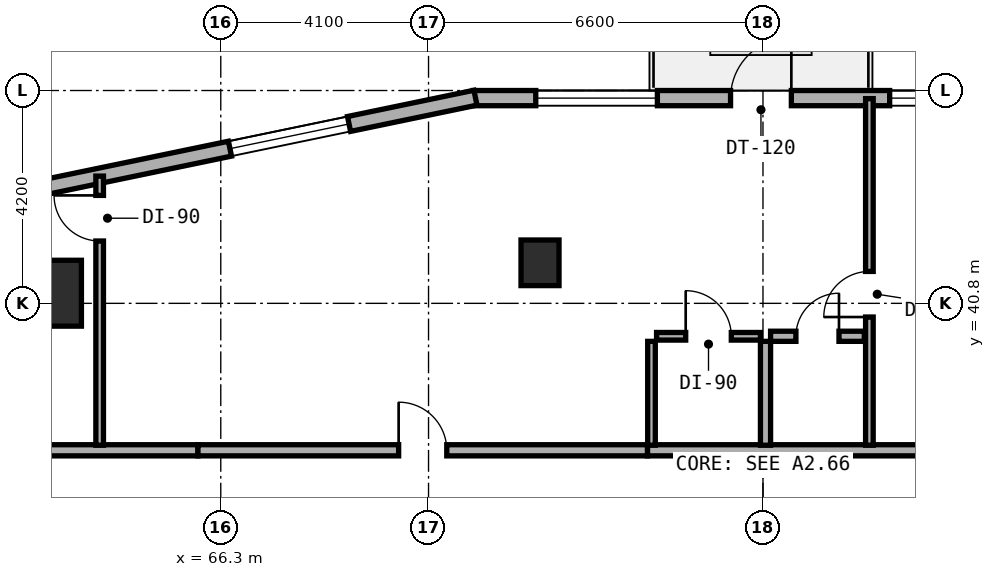
"""IFC4 building model, lengths in metres.
Left out: names, types, materials, properties, quantities, classifications, styles, units other than length and angle.
Written with IfcOpenShell. Run it as: python <this file> out.ifc"""

import sys

from ifc_helpers import new_model, si_unit, direction, frame, frame_2d, origin, origin_2d, place, context, subcontext, project, spatial, rectangle, extrude, element, fill, save


model = new_model("IFC4")
c1 = context("Model", 3, precision=1e-05, world=origin(), true_north=direction((0.0, 1.0)))
c2 = subcontext(c1, "Body", "Model", "MODEL_VIEW")
j1 = project(units=[si_unit("LENGTHUNIT", "METRE"), si_unit("PLANEANGLEUNIT", "RADIAN")], contexts=[c1])
p1 = place(None, origin())
s1 = spatial("IfcSite", under=j1, at=p1, CompositionType="ELEMENT")
p2 = place(p1, origin())
s2 = spatial("IfcBuilding", under=s1, at=p2, CompositionType="ELEMENT")
p3 = place(p2, frame((0.0, 0.0, 48.5)))
s3 = spatial("IfcBuildingStorey", under=s2, at=p3, CompositionType="ELEMENT", Elevation=48.5)
p4 = place(p3, frame((72.6, 41.6, 0.0), z_axis=(0.0, 0.0, 1.0), x_axis=(1.0, 0.0, 0.0)))
e1 = element("IfcColumn", 1, at=p4, inside=s3, PredefinedType="COLUMN", context=c2, shape_type="SweptSolid", body=[
    extrude(rectangle(XDim=0.75, YDim=0.9, at=origin_2d()), origin(), (0.0, 0.0, 1.0), 3.5),
])
p5 = place(p3, frame((63.0, 41.0, 0.0), z_axis=(0.0, 0.0, 1.0), x_axis=(1.0, 0.0, 0.0)))
e2 = element("IfcColumn", 2, at=p5, inside=s3, PredefinedType="COLUMN", context=c2, shape_type="SweptSolid", body=[
    extrude(rectangle(XDim=1.1, YDim=1.3, at=origin_2d()), origin(), (0.0, 0.0, 1.0), 3.5),
])
p6 = place(p3, frame((82.673, 44.85, 0.0), z_axis=(0.0, 0.0, 1.0), x_axis=(-1.0, 0.0, 0.0)))
e3 = element("IfcWall", 3, at=p6, inside=s3, PredefinedType="STANDARD", context=c2, shape_type="SweptSolid", body=[
    extrude(rectangle(XDim=11.391, YDim=0.3, at=frame_2d((5.696, 0.0))), origin(), (0.0, 0.0, 1.0), 3.25),
])
p7 = place(p6, frame((5.113, 0.0, 0.0)))
e4 = element("IfcOpeningElement", 4, at=p7, cuts=e3, PredefinedType="OPENING", context=c2, shape_type="SweptSolid", body=[
    extrude(rectangle(XDim=1.2, YDim=2.15, at=frame_2d((0.6, 1.075))), frame((0.0, 0.16, 0.0), z_axis=(0.0, -1.0, 0.0), x_axis=(1.0, 0.0, 0.0)), (0.0, 0.0, 1.0), 0.32),
])
p8 = place(p6, frame((1.673, 0.0, 0.85)))
e5 = element("IfcOpeningElement", 5, at=p8, cuts=e3, PredefinedType="OPENING", context=c2, shape_type="SweptSolid", body=[
    extrude(rectangle(XDim=1.5, YDim=1.5, at=frame_2d((0.75, 0.75))), frame((0.0, 0.16, 0.0), z_axis=(0.0, -1.0, 0.0), x_axis=(1.0, 0.0, 0.0)), (0.0, 0.0, 1.0), 0.32),
])
p9 = place(p6, frame((7.757, 0.0, 0.8)))
e6 = element("IfcOpeningElement", 6, at=p9, cuts=e3, PredefinedType="OPENING", context=c2, shape_type="SweptSolid", body=[
    extrude(rectangle(XDim=2.4, YDim=1.6, at=frame_2d((1.2, 0.8))), frame((0.0, 0.16, 0.0), z_axis=(0.0, -1.0, 0.0), x_axis=(1.0, 0.0, 0.0)), (0.0, 0.0, 1.0), 0.32),
])
p10 = place(p3, frame((71.326, 44.858, 0.0), z_axis=(0.0, 0.0, 1.0), x_axis=(-0.979124350489, -0.203262161453, 0.0)))
e7 = element("IfcWall", 7, at=p10, inside=s3, PredefinedType="STANDARD", context=c2, shape_type="SweptSolid", body=[
    extrude(rectangle(XDim=8.889, YDim=0.3, at=frame_2d((4.445, 0.0))), origin(), (0.0, 0.0, 1.0), 3.25),
])
p11 = place(p10, frame((2.548, 0.0, 0.8)))
e8 = element("IfcOpeningElement", 8, at=p11, cuts=e7, PredefinedType="OPENING", context=c2, shape_type="SweptSolid", body=[
    extrude(rectangle(XDim=2.4, YDim=1.6, at=frame_2d((1.2, 0.8))), frame((0.0, 0.16, 0.0), z_axis=(0.0, -1.0, 0.0), x_axis=(1.0, 0.0, 0.0)), (0.0, 0.0, 1.0), 0.32),
])
p12 = place(p3, frame((58.16, 37.9, 0.0), z_axis=(0.0, 0.0, 1.0), x_axis=(1.0, 0.0, 0.0)))
e9 = element("IfcWall", 9, at=p12, inside=s3, PredefinedType="SOLIDWALL", context=c2, shape_type="SweptSolid", body=[
    extrude(rectangle(XDim=7.69, YDim=0.22, at=frame_2d((3.845, 0.0))), origin(), (0.0, 0.0, 1.0), 2.865),
])
p13 = place(p3, frame((74.72, 37.9, 0.0), z_axis=(0.0, 0.0, 1.0), x_axis=(1.0, 0.0, 0.0)))
e10 = element("IfcWall", 10, at=p13, inside=s3, PredefinedType="SOLIDWALL", context=c2, shape_type="SweptSolid", body=[
    extrude(rectangle(XDim=6.68, YDim=0.22, at=frame_2d((3.34, 0.0))), origin(), (0.0, 0.0, 1.0), 2.725),
])
p14 = place(p3, frame((65.85, 37.9, 0.0), z_axis=(0.0, 0.0, 1.0), x_axis=(1.0, 0.0, 0.0)))
e11 = element("IfcWall", 11, at=p14, inside=s3, PredefinedType="SOLIDWALL", context=c2, shape_type="SweptSolid", body=[
    extrude(rectangle(XDim=8.87, YDim=0.22, at=frame_2d((4.435, 0.0))), origin(), (0.0, 0.0, 1.0), 2.725),
])
p15 = place(p14, frame((3.96, 0.0, 0.0)))
e12 = element("IfcOpeningElement", 12, at=p15, cuts=e11, PredefinedType="OPENING", context=c2, shape_type="SweptSolid", body=[
    extrude(rectangle(XDim=0.95, YDim=2.1, at=frame_2d((0.475, 1.05))), frame((0.0, 0.12, 0.0), z_axis=(0.0, -1.0, 0.0), x_axis=(1.0, 0.0, 0.0)), (0.0, 0.0, 1.0), 0.24),
])
p16 = place(p3, frame((63.91, 38.0, 0.0), z_axis=(0.0, 0.0, 1.0), x_axis=(0.0, 1.0, 0.0)))
e13 = element("IfcWall", 13, at=p16, inside=s3, PredefinedType="PARTITIONING", context=c2, shape_type="SweptSolid", body=[
    extrude(rectangle(XDim=5.311, YDim=0.15, at=frame_2d((2.656, 0.0))), origin(), (0.0, 0.0, 1.0), 2.865),
])
p17 = place(p16, frame((4.03, 0.0, 0.0)))
e14 = element("IfcOpeningElement", 14, at=p17, cuts=e13, PredefinedType="OPENING", context=c2, shape_type="SweptSolid", body=[
    extrude(rectangle(XDim=0.9, YDim=2.1, at=frame_2d((0.45, 1.05))), frame((0.0, 0.085, 0.0), z_axis=(0.0, -1.0, 0.0), x_axis=(1.0, 0.0, 0.0)), (0.0, 0.0, 1.0), 0.17),
])
p18 = place(p3, frame((79.1, 38.0, 0.0), z_axis=(0.0, 0.0, 1.0), x_axis=(0.0, 1.0, 0.0)))
e15 = element("IfcWall", 15, at=p18, inside=s3, PredefinedType="PARTITIONING", context=c2, shape_type="SweptSolid", body=[
    extrude(rectangle(XDim=6.84, YDim=0.15, at=frame_2d((3.42, 0.0))), origin(), (0.0, 0.0, 1.0), 2.865),
])
p19 = place(p18, frame((2.53, 0.0, 0.0)))
e16 = element("IfcOpeningElement", 16, at=p19, cuts=e15, PredefinedType="OPENING", context=c2, shape_type="SweptSolid", body=[
    extrude(rectangle(XDim=0.9, YDim=2.1, at=frame_2d((0.45, 1.05))), frame((0.0, 0.085, 0.0), z_axis=(0.0, -1.0, 0.0), x_axis=(1.0, 0.0, 0.0)), (0.0, 0.0, 1.0), 0.17),
])
p20 = place(p3, frame((77.05, 38.0, 0.0), z_axis=(0.0, 0.0, 1.0), x_axis=(0.0, 1.0, 0.0)))
e17 = element("IfcWall", 17, at=p20, inside=s3, PredefinedType="PLUMBINGWALL", context=c2, shape_type="SweptSolid", body=[
    extrude(rectangle(XDim=2.05, YDim=0.2, at=frame_2d((1.025, 0.0))), origin(), (0.0, 0.0, 1.0), 2.985),
])
p21 = place(p3, frame((74.8, 38.0, 0.0), z_axis=(0.0, 0.0, 1.0), x_axis=(0.0, 1.0, 0.0)))
e18 = element("IfcWall", 18, at=p21, inside=s3, PredefinedType="PARTITIONING", context=c2, shape_type="SweptSolid", body=[
    extrude(rectangle(XDim=2.05, YDim=0.15, at=frame_2d((1.025, 0.0))), origin(), (0.0, 0.0, 1.0), 2.985),
])
p22 = place(p3, frame((77.15, 40.15, 0.0), z_axis=(0.0, 0.0, 1.0), x_axis=(1.0, 0.0, 0.0)))
e19 = element("IfcWall", 19, at=p22, inside=s3, PredefinedType="PLUMBINGWALL", context=c2, shape_type="SweptSolid", body=[
    extrude(rectangle(XDim=1.85, YDim=0.2, at=frame_2d((0.925, 0.0))), origin(), (0.0, 0.0, 1.0), 3.22),
])
p23 = place(p22, frame((0.5, 0.0, 0.0)))
e20 = element("IfcOpeningElement", 20, at=p23, cuts=e19, PredefinedType="OPENING", context=c2, shape_type="SweptSolid", body=[
    extrude(rectangle(XDim=0.85, YDim=2.1, at=frame_2d((0.425, 1.05))), frame((0.0, 0.11, 0.0), z_axis=(0.0, -1.0, 0.0), x_axis=(1.0, 0.0, 0.0)), (0.0, 0.0, 1.0), 0.22),
])
p24 = place(p3, frame((74.9, 40.15, 0.0), z_axis=(0.0, 0.0, 1.0), x_axis=(1.0, 0.0, 0.0)))
e21 = element("IfcWall", 21, at=p24, inside=s3, PredefinedType="PARTITIONING", context=c2, shape_type="SweptSolid", body=[
    extrude(rectangle(XDim=2.05, YDim=0.15, at=frame_2d((1.025, 0.0))), origin(), (0.0, 0.0, 1.0), 3.22),
])
p25 = place(p24, frame((0.575, 0.0, 0.0)))
e22 = element("IfcOpeningElement", 22, at=p25, cuts=e21, PredefinedType="OPENING", context=c2, shape_type="SweptSolid", body=[
    extrude(rectangle(XDim=0.9, YDim=2.1, at=frame_2d((0.45, 1.05))), frame((0.0, 0.085, 0.0), z_axis=(0.0, -1.0, 0.0), x_axis=(1.0, 0.0, 0.0)), (0.0, 0.0, 1.0), 0.17),
])
p26 = place(p7, frame((1.2, 0.0, 0.0), z_axis=(0.0, 0.0, 1.0), x_axis=(-1.0, 0.0, 0.0)))
e23 = element("IfcDoor", 23, at=p26, inside=s3, OperationType="SINGLE_SWING_RIGHT", PredefinedType="DOOR", context=c2, shape_type="SweptSolid", body=[
    extrude(rectangle(XDim=1.2, YDim=2.15, at=frame_2d((0.6, 1.075))), frame((0.0, 0.025, 0.0), z_axis=(0.0, -1.0, 0.0), x_axis=(1.0, 0.0, 0.0)), (0.0, 0.0, 1.0), 0.05),
])
fill(e4, e23)
p27 = place(p8, origin())
e24 = element("IfcWindow", 24, at=p27, inside=s3, PartitioningType="SINGLE_PANEL", PredefinedType="WINDOW", context=c2, shape_type="SweptSolid", body=[
    extrude(rectangle(XDim=1.5, YDim=1.5, at=frame_2d((0.75, 0.75))), frame((0.0, 0.03, 0.0), z_axis=(0.0, -1.0, 0.0), x_axis=(1.0, 0.0, 0.0)), (0.0, 0.0, 1.0), 0.06),
])
fill(e5, e24)
p28 = place(p9, origin())
e25 = element("IfcWindow", 25, at=p28, inside=s3, PartitioningType="SINGLE_PANEL", PredefinedType="WINDOW", context=c2, shape_type="SweptSolid", body=[
    extrude(rectangle(XDim=2.4, YDim=1.6, at=frame_2d((1.2, 0.8))), frame((0.0, 0.03, 0.0), z_axis=(0.0, -1.0, 0.0), x_axis=(1.0, 0.0, 0.0)), (0.0, 0.0, 1.0), 0.06),
])
fill(e6, e25)
p29 = place(p11, origin())
e26 = element("IfcWindow", 26, at=p29, inside=s3, PartitioningType="SINGLE_PANEL", PredefinedType="WINDOW", context=c2, shape_type="SweptSolid", body=[
    extrude(rectangle(XDim=2.4, YDim=1.6, at=frame_2d((1.2, 0.8))), frame((0.0, 0.03, 0.0), z_axis=(0.0, -1.0, 0.0), x_axis=(1.0, 0.0, 0.0)), (0.0, 0.0, 1.0), 0.06),
])
fill(e8, e26)
p30 = place(p15, origin())
e27 = element("IfcDoor", 27, at=p30, inside=s3, OperationType="SINGLE_SWING_LEFT", PredefinedType="DOOR", context=c2, shape_type="SweptSolid", body=[
    extrude(rectangle(XDim=0.95, YDim=2.1, at=frame_2d((0.475, 1.05))), frame((0.0, 0.025, 0.0), z_axis=(0.0, -1.0, 0.0), x_axis=(1.0, 0.0, 0.0)), (0.0, 0.0, 1.0), 0.05),
])
fill(e12, e27)
p31 = place(p17, origin())
e28 = element("IfcDoor", 28, at=p31, inside=s3, OperationType="SINGLE_SWING_RIGHT", PredefinedType="DOOR", context=c2, shape_type="SweptSolid", body=[
    extrude(rectangle(XDim=0.9, YDim=2.1, at=frame_2d((0.45, 1.05))), frame((0.0, 0.025, 0.0), z_axis=(0.0, -1.0, 0.0), x_axis=(1.0, 0.0, 0.0)), (0.0, 0.0, 1.0), 0.05),
])
fill(e14, e28)
p32 = place(p19, origin())
e29 = element("IfcDoor", 29, at=p32, inside=s3, OperationType="SINGLE_SWING_LEFT", PredefinedType="DOOR", context=c2, shape_type="SweptSolid", body=[
    extrude(rectangle(XDim=0.9, YDim=2.1, at=frame_2d((0.45, 1.05))), frame((0.0, 0.025, 0.0), z_axis=(0.0, -1.0, 0.0), x_axis=(1.0, 0.0, 0.0)), (0.0, 0.0, 1.0), 0.05),
])
fill(e16, e29)
p33 = place(p23, origin())
e30 = element("IfcDoor", 30, at=p33, inside=s3, OperationType="SINGLE_SWING_RIGHT", PredefinedType="DOOR", context=c2, shape_type="SweptSolid", body=[
    extrude(rectangle(XDim=0.85, YDim=2.1, at=frame_2d((0.425, 1.05))), frame((0.0, 0.025, 0.0), z_axis=(0.0, -1.0, 0.0), x_axis=(1.0, 0.0, 0.0)), (0.0, 0.0, 1.0), 0.05),
])
fill(e20, e30)
p34 = place(p25, origin())
e31 = element("IfcDoor", 31, at=p34, inside=s3, OperationType="SINGLE_SWING_LEFT", PredefinedType="DOOR", context=c2, shape_type="SweptSolid", body=[
    extrude(rectangle(XDim=0.9, YDim=2.1, at=frame_2d((0.45, 1.05))), frame((0.0, 0.025, 0.0), z_axis=(0.0, -1.0, 0.0), x_axis=(1.0, 0.0, 0.0)), (0.0, 0.0, 1.0), 0.05),
])
fill(e22, e31)
save(model, sys.argv[1])
